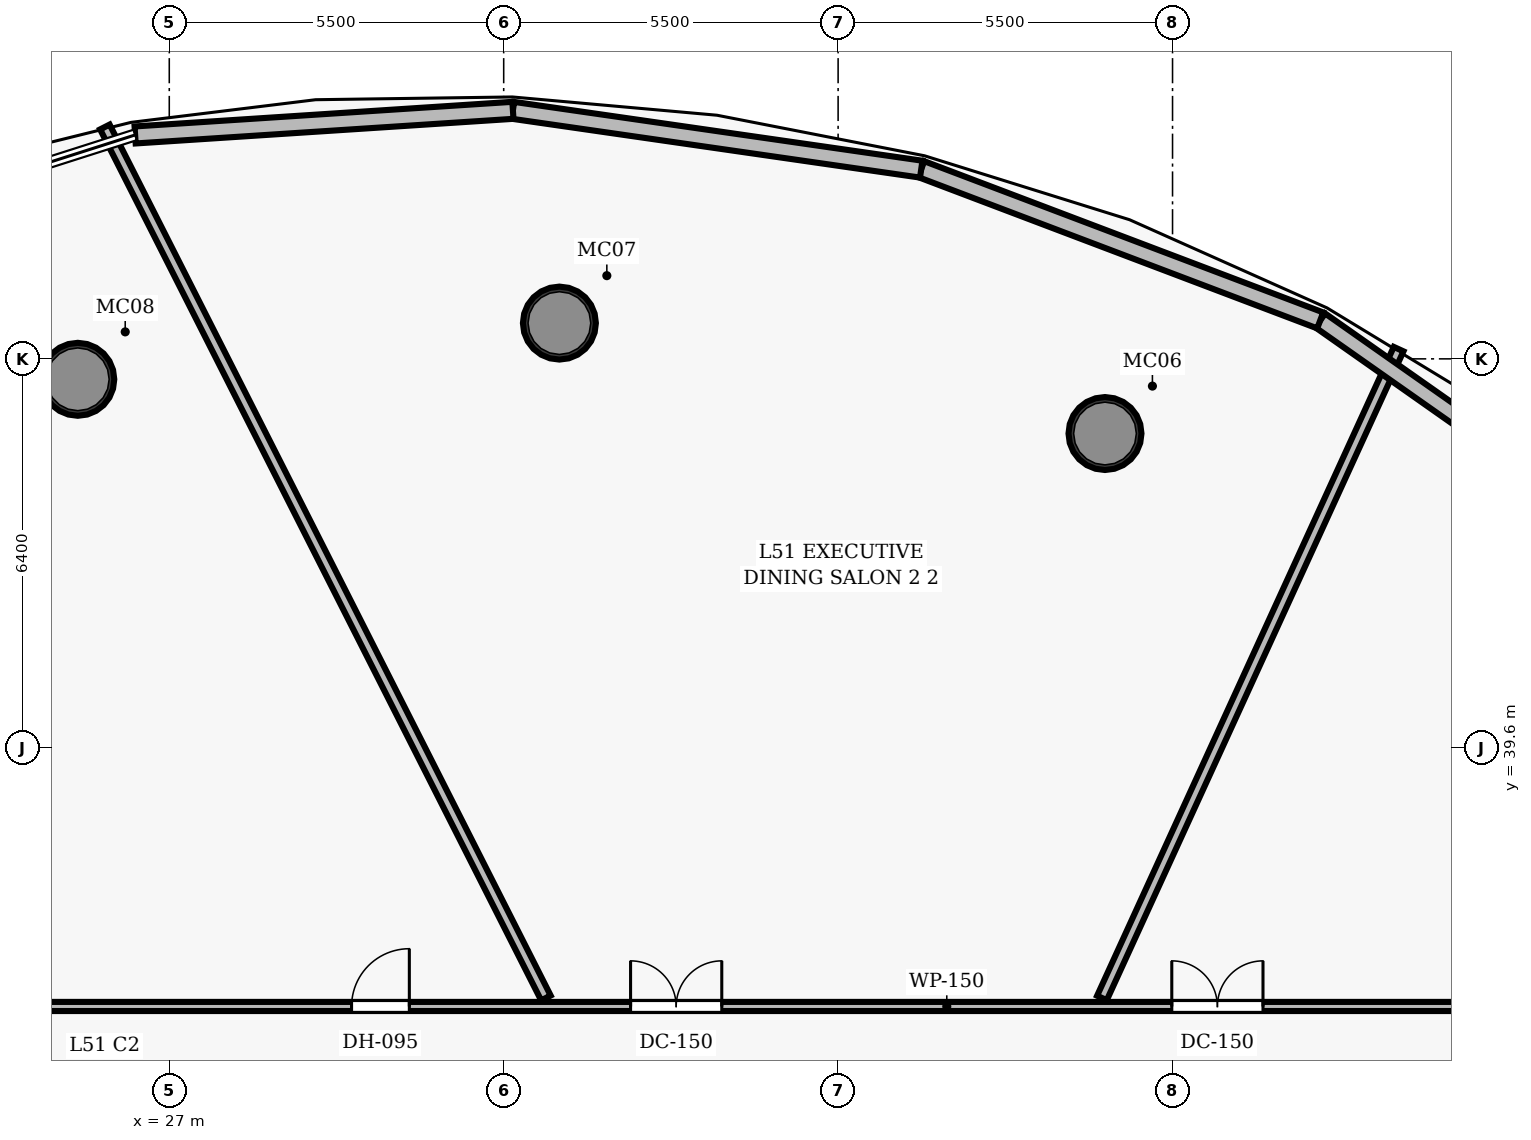
"""IFC4 building model, lengths in metres.
Left out: names, types, materials, properties, quantities, classifications, styles, units other than length and angle.
Written with IfcOpenShell. Run it as: python <this file> out.ifc"""

import sys

from ifc_helpers import new_model, si_unit, direction, frame, frame_2d, origin, origin_2d, place, context, subcontext, project, spatial, rectangle, hollow_circle, extrude, element, fill, save


model = new_model("IFC4")
c1 = context("Model", 3, precision=1e-05, world=origin(), true_north=direction((0.0, 1.0)))
c2 = subcontext(c1, "Body", "Model", "MODEL_VIEW")
j1 = project(units=[si_unit("LENGTHUNIT", "METRE"), si_unit("PLANEANGLEUNIT", "RADIAN")], contexts=[c1])
p1 = place(None, origin())
s1 = spatial("IfcSite", under=j1, at=p1, CompositionType="ELEMENT")
p2 = place(p1, origin())
s2 = spatial("IfcBuilding", under=s1, at=p2, CompositionType="ELEMENT")
p3 = place(p2, frame((0.0, 0.0, 202.0)))
s3 = spatial("IfcBuildingStorey", under=s2, at=p3, CompositionType="ELEMENT", Elevation=202.0)
for number, where, z_axis, x_axis in (
    (1, (42.389, 44.772, 0.0), (0.0, 0.0, 1.0), (1.0, 0.0, 0.0)),
    (2, (33.416, 46.588, 0.0), (0.0, 0.0, 1.0), (1.0, 0.0, 0.0)),
    (3, (25.496, 45.664, 0.0), (0.0, 0.0, 1.0), (1.0, 0.0, 0.0)),
):
    element("IfcColumn", number, at=place(p3, frame(where, z_axis=z_axis, x_axis=x_axis)), inside=s3, PredefinedType="COLUMN", context=c2, shape_type="SweptSolid", body=[
        extrude(hollow_circle(Radius=0.6, WallThickness=0.05, at=origin_2d()), origin(), (0.0, 0.0, 1.0), 3.85),
    ])
p4 = place(p3, frame((24.85, 35.35, 0.0), z_axis=(0.0, 0.0, 1.0), x_axis=(1.0, 0.0, 0.0)))
e4 = element("IfcWall", 4, at=p4, inside=s3, PredefinedType="PARTITIONING", context=c2, shape_type="SweptSolid", body=[
    extrude(rectangle(XDim=26.0, YDim=0.15, at=frame_2d((13.0, 0.0))), origin(), (0.0, 0.0, 1.0), 3.035),
])
p5 = place(p4, frame((18.638, 0.0, 0.0)))
e5 = element("IfcOpeningElement", 5, at=p5, cuts=e4, PredefinedType="OPENING", context=c2, shape_type="SweptSolid", body=[
    extrude(rectangle(XDim=1.5, YDim=2.2, at=frame_2d((0.75, 1.1))), frame((0.0, 0.085, 0.0), z_axis=(0.0, -1.0, 0.0), x_axis=(1.0, 0.0, 0.0)), (0.0, 0.0, 1.0), 0.17),
])
p6 = place(p4, frame((9.737, 0.0, 0.0)))
e6 = element("IfcOpeningElement", 6, at=p6, cuts=e4, PredefinedType="OPENING", context=c2, shape_type="SweptSolid", body=[
    extrude(rectangle(XDim=1.5, YDim=2.2, at=frame_2d((0.75, 1.1))), frame((0.0, 0.085, 0.0), z_axis=(0.0, -1.0, 0.0), x_axis=(1.0, 0.0, 0.0)), (0.0, 0.0, 1.0), 0.17),
])
p7 = place(p4, frame((5.148, 0.0, 0.0)))
e7 = element("IfcOpeningElement", 7, at=p7, cuts=e4, PredefinedType="OPENING", context=c2, shape_type="SweptSolid", body=[
    extrude(rectangle(XDim=0.95, YDim=2.15, at=frame_2d((0.475, 1.075))), frame((0.0, 0.085, 0.0), z_axis=(0.0, -1.0, 0.0), x_axis=(1.0, 0.0, 0.0)), (0.0, 0.0, 1.0), 0.17),
])
p8 = place(p3, frame((42.339, 35.49, 0.0), z_axis=(0.0, 0.0, 1.0), x_axis=(0.415830571433, 0.909442101434, 0.0)))
e8 = element("IfcWall", 8, at=p8, inside=s3, PredefinedType="PARTITIONING", context=c2, shape_type="SweptSolid", body=[
    extrude(rectangle(XDim=11.733, YDim=0.175, at=frame_2d((5.866, 0.0))), origin(), (0.0, 0.0, 1.0), 3.035),
])
p9 = place(p3, frame((33.194, 35.49, 0.0), z_axis=(0.0, 0.0, 1.0), x_axis=(-0.451769726671, 0.892134582932, 0.0)))
e9 = element("IfcWall", 9, at=p9, inside=s3, PredefinedType="PARTITIONING", context=c2, shape_type="SweptSolid", body=[
    extrude(rectangle(XDim=16.055, YDim=0.175, at=frame_2d((8.027, 0.0))), origin(), (0.0, 0.0, 1.0), 3.035),
])
p10 = place(p3, frame((45.929, 46.632, 0.0), z_axis=(0.0, 0.0, 1.0), x_axis=(0.818111945774, -0.575058991915, 0.0)))
e10 = element("IfcWall", 10, at=p10, inside=s3, PredefinedType="SOLIDWALL", context=c2, shape_type="SweptSolid", body=[
    extrude(rectangle(XDim=7.045, YDim=0.28, at=frame_2d((3.523, 0.0))), origin(), (0.0, 0.0, 1.0), 3.62),
])
p11 = place(p3, frame((39.367, 49.12, 0.0), z_axis=(0.0, 0.0, 1.0), x_axis=(0.935067918336, -0.354468599595, 0.0)))
e11 = element("IfcWall", 11, at=p11, inside=s3, PredefinedType="SOLIDWALL", context=c2, shape_type="SweptSolid", body=[
    extrude(rectangle(XDim=7.018, YDim=0.28, at=frame_2d((3.509, 0.0))), origin(), (0.0, 0.0, 1.0), 3.62),
])
p12 = place(p3, frame((32.652, 50.087, 0.0), z_axis=(0.0, 0.0, 1.0), x_axis=(0.989784738796, -0.142569880575, 0.0)))
e12 = element("IfcWall", 12, at=p12, inside=s3, PredefinedType="SOLIDWALL", context=c2, shape_type="SweptSolid", body=[
    extrude(rectangle(XDim=6.785, YDim=0.28, at=frame_2d((3.392, 0.0))), origin(), (0.0, 0.0, 1.0), 3.62),
])
p13 = place(p3, frame((26.438, 49.682, 0.0), z_axis=(0.0, 0.0, 1.0), x_axis=(0.997881932346, 0.065051126793, 0.0)))
e13 = element("IfcWall", 13, at=p13, inside=s3, PredefinedType="SOLIDWALL", context=c2, shape_type="SweptSolid", body=[
    extrude(rectangle(XDim=6.226, YDim=0.28, at=frame_2d((3.113, 0.0))), origin(), (0.0, 0.0, 1.0), 3.62),
])
p14 = place(p5, origin())
e14 = element("IfcDoor", 14, at=p14, inside=s3, OperationType="DOUBLE_DOOR_SINGLE_SWING", PredefinedType="DOOR", context=c2, shape_type="SweptSolid", body=[
    extrude(rectangle(XDim=1.5, YDim=2.2, at=frame_2d((0.75, 1.1))), frame((0.0, 0.025, 0.0), z_axis=(0.0, -1.0, 0.0), x_axis=(1.0, 0.0, 0.0)), (0.0, 0.0, 1.0), 0.05),
])
fill(e5, e14)
p15 = place(p6, origin())
e15 = element("IfcDoor", 15, at=p15, inside=s3, OperationType="DOUBLE_DOOR_SINGLE_SWING", PredefinedType="DOOR", context=c2, shape_type="SweptSolid", body=[
    extrude(rectangle(XDim=1.5, YDim=2.2, at=frame_2d((0.75, 1.1))), frame((0.0, 0.025, 0.0), z_axis=(0.0, -1.0, 0.0), x_axis=(1.0, 0.0, 0.0)), (0.0, 0.0, 1.0), 0.05),
])
fill(e6, e15)
p16 = place(p7, origin())
e16 = element("IfcDoor", 16, at=p16, inside=s3, OperationType="SINGLE_SWING_RIGHT", PredefinedType="DOOR", context=c2, shape_type="SweptSolid", body=[
    extrude(rectangle(XDim=0.95, YDim=2.15, at=frame_2d((0.475, 1.075))), frame((0.0, 0.025, 0.0), z_axis=(0.0, -1.0, 0.0), x_axis=(1.0, 0.0, 0.0)), (0.0, 0.0, 1.0), 0.05),
])
fill(e7, e16)
save(model, sys.argv[1])
